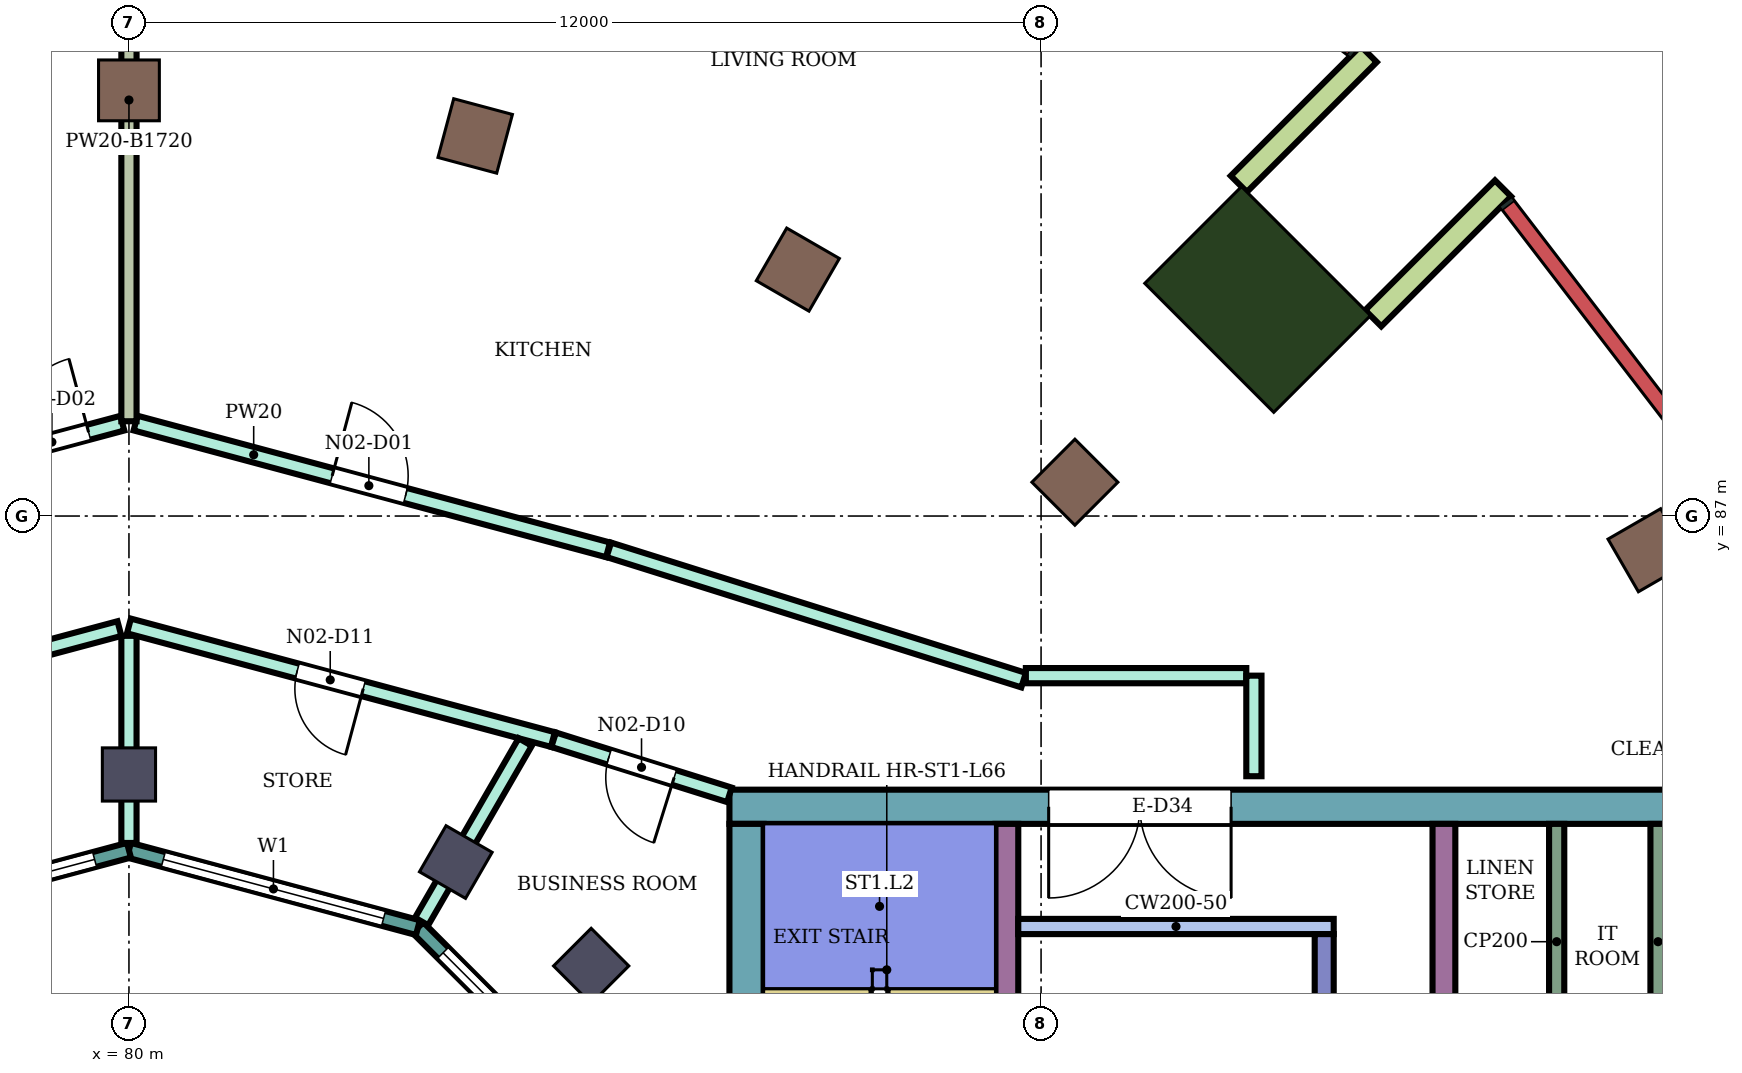
"""IFC4 building model, lengths in metres.
Left out: names, types, materials, properties, quantities, classifications, styles, units other than length and angle.
Written with IfcOpenShell. Run it as: python <this file> out.ifc"""

import sys

from ifc_helpers import new_model, si_unit, direction, frame, frame_2d, origin, origin_2d, place, context, subcontext, project, spatial, rectangle, extrude, element, fill, save


model = new_model("IFC4")
c1 = context("Model", 3, precision=1e-05, world=origin(), true_north=direction((0.0, 1.0)))
c2 = subcontext(c1, "Body", "Model", "MODEL_VIEW")
j1 = project(units=[si_unit("LENGTHUNIT", "METRE"), si_unit("PLANEANGLEUNIT", "RADIAN")], contexts=[c1])
p1 = place(None, origin())
s1 = spatial("IfcSite", under=j1, at=p1, CompositionType="ELEMENT")
p2 = place(p1, origin())
s2 = spatial("IfcBuilding", under=s1, at=p2, CompositionType="ELEMENT")
p3 = place(p2, frame((0.0, 0.0, 288.3)))
s3 = spatial("IfcBuildingStorey", under=s2, at=p3, CompositionType="ELEMENT", Elevation=288.3)
for number, where, z_axis, x_axis in (
    (1, (100.005, 86.55, 0.0), (0.0, 0.0, 1.0), (0.866, 0.5, 0.0)),
    (2, (92.445, 87.445, 0.0), (0.0, 0.0, 1.0), (0.707, 0.707, 0.0)),
    (3, (88.8, 90.242, 0.0), (0.0, 0.0, 1.0), (0.5, 0.866, 0.0)),
    (4, (84.555, 92.0, 0.0), (0.0, 0.0, 1.0), (0.259, 0.966, 0.0)),
    (5, (80.0, 92.6, 0.0), (0.0, 0.0, 1.0), (0.0, 1.0, 0.0)),
):
    element("IfcColumn", number, at=place(p3, frame(where, z_axis=z_axis, x_axis=x_axis)), inside=s3, PredefinedType="COLUMN", context=c2, shape_type="SweptSolid", body=[
        extrude(rectangle(XDim=0.8, YDim=0.8, at=origin_2d()), origin(), (0.0, 0.0, 1.0), 4.2),
    ])
for number, where, z_axis, x_axis in (
    (6, (86.081, 81.081, 0.0), (0.0, 0.0, 1.0), (0.707, 0.707, 0.0)),
    (7, (84.3, 82.448, 0.0), (0.0, 0.0, 1.0), (0.5, 0.866, 0.0)),
    (8, (80.0, 83.6, 0.0), (0.0, 0.0, 1.0), (0.0, 1.0, 0.0)),
):
    element("IfcColumn", number, at=place(p3, frame(where, z_axis=z_axis, x_axis=x_axis)), inside=s3, PredefinedType="COLUMN", context=c2, shape_type="SweptSolid", body=[
        extrude(rectangle(XDim=0.7, YDim=0.7, at=origin_2d()), origin(), (0.0, 0.0, 1.0), 4.2),
    ])
p4 = place(p3, frame((94.849, 89.849, 0.0), z_axis=(0.0, 0.0, 1.0), x_axis=(0.707106781187, 0.707106781187, 0.0)))
e9 = element("IfcColumn", 9, at=p4, inside=s3, PredefinedType="COLUMN", context=c2, shape_type="SweptSolid", body=[
    extrude(rectangle(XDim=1.8, YDim=2.4, at=origin_2d()), origin(), (0.0, 0.0, 1.0), 4.2),
])
p5 = place(p3, frame((87.9, 83.175, 0.0), z_axis=(0.0, 0.0, 1.0), x_axis=(1.0, 0.0, 0.0)))
e10 = element("IfcWall", 10, at=p5, inside=s3, PredefinedType="SHEAR", context=c2, shape_type="SweptSolid", body=[
    extrude(rectangle(XDim=13.55, YDim=0.45, at=frame_2d((6.775, 0.0))), origin(), (0.0, 0.0, 1.0), 3.88),
])
p6 = place(p5, frame((4.2, 0.0, 0.0)))
e11 = element("IfcOpeningElement", 11, at=p6, cuts=e10, PredefinedType="OPENING", context=c2, shape_type="SweptSolid", body=[
    extrude(rectangle(XDim=2.4, YDim=2.4, at=frame_2d((1.2, 1.2))), frame((0.0, 0.235, 0.0), z_axis=(0.0, -1.0, 0.0), x_axis=(1.0, 0.0, 0.0)), (0.0, 0.0, 1.0), 0.47),
])
p7 = place(p3, frame((88.125, 75.0, 0.0), z_axis=(0.0, 0.0, 1.0), x_axis=(0.0, 1.0, 0.0)))
e12 = element("IfcWall", 12, at=p7, inside=s3, PredefinedType="SHEAR", context=c2, shape_type="SweptSolid", body=[
    extrude(rectangle(XDim=7.95, YDim=0.45, at=frame_2d((3.975, 0.0))), origin(), (0.0, 0.0, 1.0), 3.88),
])
p8 = place(p3, frame((91.55, 75.0, 0.0), z_axis=(0.0, 0.0, 1.0), x_axis=(0.0, 1.0, 0.0)))
e13 = element("IfcWall", 13, at=p8, inside=s3, PredefinedType="SHEAR", context=c2, shape_type="SweptSolid", body=[
    extrude(rectangle(XDim=7.95, YDim=0.3, at=frame_2d((3.975, 0.0))), origin(), (0.0, 0.0, 1.0), 3.88),
])
p9 = place(p8, frame((1.85, 0.0, 0.0)))
e14 = element("IfcOpeningElement", 14, at=p9, cuts=e13, PredefinedType="OPENING", context=c2, shape_type="SweptSolid", body=[
    extrude(rectangle(XDim=0.9, YDim=2.1, at=frame_2d((0.45, 1.05))), frame((0.0, 0.16, 0.0), z_axis=(0.0, -1.0, 0.0), x_axis=(1.0, 0.0, 0.0)), (0.0, 0.0, 1.0), 0.32),
])
p10 = place(p3, frame((91.7, 81.6, 0.0), z_axis=(0.0, 0.0, 1.0), x_axis=(1.0, 0.0, 0.0)))
e15 = element("IfcWall", 15, at=p10, inside=s3, PredefinedType="SHEAR", context=c2, shape_type="SweptSolid", body=[
    extrude(rectangle(XDim=4.15, YDim=0.2, at=frame_2d((2.075, 0.0))), origin(), (0.0, 0.0, 1.0), 3.88),
])
p11 = place(p3, frame((95.725, 78.55, 0.0), z_axis=(0.0, 0.0, 1.0), x_axis=(0.0, 1.0, 0.0)))
e16 = element("IfcWall", 16, at=p11, inside=s3, PredefinedType="SHEAR", context=c2, shape_type="SweptSolid", body=[
    extrude(rectangle(XDim=2.95, YDim=0.25, at=frame_2d((1.475, 0.0))), origin(), (0.0, 0.0, 1.0), 3.88),
])
p12 = place(p11, frame((1.025, 0.0, 0.0)))
e17 = element("IfcOpeningElement", 17, at=p12, cuts=e16, PredefinedType="OPENING", context=c2, shape_type="SweptSolid", body=[
    extrude(rectangle(XDim=0.9, YDim=2.1, at=frame_2d((0.45, 1.05))), frame((0.0, 0.135, 0.0), z_axis=(0.0, -1.0, 0.0), x_axis=(1.0, 0.0, 0.0)), (0.0, 0.0, 1.0), 0.27),
])
p13 = place(p3, frame((97.3, 79.55, 0.0), z_axis=(0.0, 0.0, 1.0), x_axis=(0.0, 1.0, 0.0)))
e18 = element("IfcWall", 18, at=p13, inside=s3, PredefinedType="SHEAR", context=c2, shape_type="SweptSolid", body=[
    extrude(rectangle(XDim=3.4, YDim=0.3, at=frame_2d((1.7, 0.0))), origin(), (0.0, 0.0, 1.0), 3.88),
])
for number, where, z_axis, x_axis in (
    (19, (96.37, 89.602, 0.0), (0.0, 0.0, 1.0), (0.707, 0.707, 0.0)),
    (20, (94.602, 91.37, 0.0), (0.0, 0.0, 1.0), (0.707, 0.707, 0.0)),
):
    element("IfcWall", number, at=place(p3, frame(where, z_axis=z_axis, x_axis=x_axis)), inside=s3, PredefinedType="NOTDEFINED", context=c2, shape_type="SweptSolid", body=[
        extrude(rectangle(XDim=2.416, YDim=0.3, at=frame_2d((1.208, 0.0))), origin(), (0.0, 0.0, 1.0), 4.2),
    ])
p14 = place(p3, frame((86.585, 78.802, 0.0), z_axis=(0.0, 0.0, 1.0), x_axis=(-0.707106781187, 0.707106781187, 0.0)))
e21 = element("IfcWall", 21, at=p14, inside=s3, PredefinedType="NOTDEFINED", context=c2, shape_type="SweptSolid", body=[
    extrude(rectangle(XDim=3.936, YDim=0.2, at=frame_2d((1.968, 0.0))), origin(), (0.0, 0.0, 1.0), 4.2),
])
p15 = place(p14, frame((0.468, 0.0, 0.9)))
e22 = element("IfcOpeningElement", 22, at=p15, cuts=e21, PredefinedType="OPENING", context=c2, shape_type="SweptSolid", body=[
    extrude(rectangle(XDim=3.0, YDim=2.3, at=frame_2d((1.5, 1.15))), frame((0.0, 0.11, 0.0), z_axis=(0.0, -1.0, 0.0), x_axis=(1.0, 0.0, 0.0)), (0.0, 0.0, 1.0), 0.22),
])
p16 = place(p3, frame((83.802, 81.585, 0.0), z_axis=(0.0, 0.0, 1.0), x_axis=(-0.965933654434, 0.258789828301, 0.0)))
e23 = element("IfcWall", 23, at=p16, inside=s3, PredefinedType="NOTDEFINED", context=c2, shape_type="SweptSolid", body=[
    extrude(rectangle(XDim=3.936, YDim=0.2, at=frame_2d((1.968, 0.0))), origin(), (0.0, 0.0, 1.0), 4.2),
])
p17 = place(p16, frame((0.468, 0.0, 0.9)))
e24 = element("IfcOpeningElement", 24, at=p17, cuts=e23, PredefinedType="OPENING", context=c2, shape_type="SweptSolid", body=[
    extrude(rectangle(XDim=3.0, YDim=2.3, at=frame_2d((1.5, 1.15))), frame((0.0, 0.11, 0.0), z_axis=(0.0, -1.0, 0.0), x_axis=(1.0, 0.0, 0.0)), (0.0, 0.0, 1.0), 0.22),
])
p18 = place(p3, frame((80.0, 82.604, 0.0), z_axis=(0.0, 0.0, 1.0), x_axis=(-0.965933654434, -0.258789828301, 0.0)))
e25 = element("IfcWall", 25, at=p18, inside=s3, PredefinedType="NOTDEFINED", context=c2, shape_type="SweptSolid", body=[
    extrude(rectangle(XDim=3.936, YDim=0.2, at=frame_2d((1.968, 0.0))), origin(), (0.0, 0.0, 1.0), 4.2),
])
p19 = place(p18, frame((0.468, 0.0, 0.9)))
e26 = element("IfcOpeningElement", 26, at=p19, cuts=e25, PredefinedType="OPENING", context=c2, shape_type="SweptSolid", body=[
    extrude(rectangle(XDim=3.0, YDim=2.3, at=frame_2d((1.5, 1.15))), frame((0.0, 0.11, 0.0), z_axis=(0.0, -1.0, 0.0), x_axis=(1.0, 0.0, 0.0)), (0.0, 0.0, 1.0), 0.22),
])
p20 = place(p3, frame((73.687, 86.554, 0.0), z_axis=(0.0, 0.0, 1.0), x_axis=(0.96595903825, 0.258695064551, 0.0)))
e27 = element("IfcWall", 27, at=p20, inside=s3, PredefinedType="PARTITIONING", context=c2, shape_type="SweptSolid", body=[
    extrude(rectangle(XDim=6.446, YDim=0.2, at=frame_2d((3.223, 0.0))), origin(), (0.0, 0.0, 1.0), 3.75),
])
p21 = place(p20, frame((4.986, 0.0, 0.0)))
e28 = element("IfcOpeningElement", 28, at=p21, cuts=e27, PredefinedType="OPENING", context=c2, shape_type="SweptSolid", body=[
    extrude(rectangle(XDim=1.0, YDim=2.1, at=frame_2d((0.5, 1.05))), frame((0.0, 0.11, 0.0), z_axis=(0.0, -1.0, 0.0), x_axis=(1.0, 0.0, 0.0)), (0.0, 0.0, 1.0), 0.22),
])
p22 = place(p3, frame((74.413, 84.057, 0.0), z_axis=(0.0, 0.0, 1.0), x_axis=(0.965972135939, 0.258646153246, 0.0)))
e29 = element("IfcWall", 29, at=p22, inside=s3, PredefinedType="PARTITIONING", context=c2, shape_type="SweptSolid", body=[
    extrude(rectangle(XDim=5.654, YDim=0.2, at=frame_2d((2.827, 0.0))), origin(), (0.0, 0.0, 1.0), 3.75),
])
p23 = place(p22, frame((2.593, 0.0, 0.0)))
e30 = element("IfcOpeningElement", 30, at=p23, cuts=e29, PredefinedType="OPENING", context=c2, shape_type="SweptSolid", body=[
    extrude(rectangle(XDim=0.9, YDim=2.1, at=frame_2d((0.45, 1.05))), frame((0.0, 0.11, 0.0), z_axis=(0.0, -1.0, 0.0), x_axis=(1.0, 0.0, 0.0)), (0.0, 0.0, 1.0), 0.22),
])
p24 = place(p3, frame((80.0, 82.699, 0.0), z_axis=(0.0, 0.0, 1.0), x_axis=(0.0, 1.0, 0.0)))
e31 = element("IfcWall", 31, at=p24, inside=s3, PredefinedType="PARTITIONING", context=c2, shape_type="SweptSolid", body=[
    extrude(rectangle(XDim=2.725, YDim=0.2, at=frame_2d((1.363, 0.0))), origin(), (0.0, 0.0, 1.0), 3.75),
])
p25 = place(p3, frame((80.0, 85.554, 0.0), z_axis=(0.0, 0.0, 1.0), x_axis=(0.965928989968, -0.258807237802, 0.0)))
e32 = element("IfcWall", 32, at=p25, inside=s3, PredefinedType="PARTITIONING", context=c2, shape_type="SweptSolid", body=[
    extrude(rectangle(XDim=5.774, YDim=0.2, at=frame_2d((2.887, 0.0))), origin(), (0.0, 0.0, 1.0), 3.75),
])
p26 = place(p25, frame((2.292, 0.0, 0.0)))
e33 = element("IfcOpeningElement", 33, at=p26, cuts=e32, PredefinedType="OPENING", context=c2, shape_type="SweptSolid", body=[
    extrude(rectangle(XDim=0.9, YDim=2.1, at=frame_2d((0.45, 1.05))), frame((0.0, 0.11, 0.0), z_axis=(0.0, -1.0, 0.0), x_axis=(1.0, 0.0, 0.0)), (0.0, 0.0, 1.0), 0.22),
])
p27 = place(p3, frame((80.087, 88.223, 0.0), z_axis=(0.0, 0.0, 1.0), x_axis=(0.965852330757, -0.25909317855, 0.0)))
e34 = element("IfcWall", 34, at=p27, inside=s3, PredefinedType="PARTITIONING", context=c2, shape_type="SweptSolid", body=[
    extrude(rectangle(XDim=6.436, YDim=0.2, at=frame_2d((3.218, 0.0))), origin(), (0.0, 0.0, 1.0), 3.75),
])
p28 = place(p27, frame((2.678, 0.0, 0.0)))
e35 = element("IfcOpeningElement", 35, at=p28, cuts=e34, PredefinedType="OPENING", context=c2, shape_type="SweptSolid", body=[
    extrude(rectangle(XDim=1.0, YDim=2.1, at=frame_2d((0.5, 1.05))), frame((0.0, 0.11, 0.0), z_axis=(0.0, -1.0, 0.0), x_axis=(1.0, 0.0, 0.0)), (0.0, 0.0, 1.0), 0.22),
])
p29 = place(p3, frame((80.0, 88.247, 0.0), z_axis=(0.0, 0.0, 1.0), x_axis=(0.0, 1.0, 0.0)))
e36 = element("IfcWall", 36, at=p29, inside=s3, PredefinedType="PARTITIONING", context=c2, shape_type="SweptSolid", body=[
    extrude(rectangle(XDim=8.452, YDim=0.2, at=frame_2d((4.226, 0.0))), origin(), (0.0, 0.0, 1.0), 2.48),
])
p30 = place(p3, frame((83.85, 81.667, 0.0), z_axis=(0.0, 0.0, 1.0), x_axis=(0.500185068774, 0.865918527909, 0.0)))
e37 = element("IfcWall", 37, at=p30, inside=s3, PredefinedType="PARTITIONING", context=c2, shape_type="SweptSolid", body=[
    extrude(rectangle(XDim=2.726, YDim=0.2, at=frame_2d((1.363, 0.0))), origin(), (0.0, 0.0, 1.0), 3.75),
])
p31 = place(p3, frame((85.587, 84.057, 0.0), z_axis=(0.0, 0.0, 1.0), x_axis=(0.954239513179, -0.299043393987, 0.0)))
e38 = element("IfcWall", 38, at=p31, inside=s3, PredefinedType="PARTITIONING", context=c2, shape_type="SweptSolid", body=[
    extrude(rectangle(XDim=2.424, YDim=0.2, at=frame_2d((1.212, 0.0))), origin(), (0.0, 0.0, 1.0), 3.75),
])
p32 = place(p31, frame((0.762, 0.0, 0.0)))
e39 = element("IfcOpeningElement", 39, at=p32, cuts=e38, PredefinedType="OPENING", context=c2, shape_type="SweptSolid", body=[
    extrude(rectangle(XDim=0.9, YDim=2.1, at=frame_2d((0.45, 1.05))), frame((0.0, 0.11, 0.0), z_axis=(0.0, -1.0, 0.0), x_axis=(1.0, 0.0, 0.0)), (0.0, 0.0, 1.0), 0.22),
])
p33 = place(p3, frame((86.313, 86.555, 0.0), z_axis=(0.0, 0.0, 1.0), x_axis=(0.9540216201, -0.299737799389, 0.0)))
e40 = element("IfcWall", 40, at=p33, inside=s3, PredefinedType="PARTITIONING", context=c2, shape_type="SweptSolid", body=[
    extrude(rectangle(XDim=5.719, YDim=0.2, at=frame_2d((2.86, 0.0))), origin(), (0.0, 0.0, 1.0), 3.75),
])
p34 = place(p3, frame((91.8, 84.9, 0.0), z_axis=(0.0, 0.0, 1.0), x_axis=(1.0, 0.0, 0.0)))
e41 = element("IfcWall", 41, at=p34, inside=s3, PredefinedType="PARTITIONING", context=c2, shape_type="SweptSolid", body=[
    extrude(rectangle(XDim=2.9, YDim=0.2, at=frame_2d((1.45, 0.0))), origin(), (0.0, 0.0, 1.0), 3.75),
])
p35 = place(p3, frame((94.8, 83.577, 0.0), z_axis=(0.0, 0.0, 1.0), x_axis=(0.0, 1.0, 0.0)))
e42 = element("IfcWall", 42, at=p35, inside=s3, PredefinedType="PARTITIONING", context=c2, shape_type="SweptSolid", body=[
    extrude(rectangle(XDim=1.323, YDim=0.2, at=frame_2d((0.662, 0.0))), origin(), (0.0, 0.0, 1.0), 3.75),
])
for number, where, z_axis, x_axis in (
    (43, (98.783, 79.85, 0.0), (0.0, 0.0, 1.0), (0.0, 1.0, 0.0)),
    (44, (100.117, 79.85, 0.0), (0.0, 0.0, 1.0), (0.0, 1.0, 0.0)),
):
    element("IfcWall", number, at=place(p3, frame(where, z_axis=z_axis, x_axis=x_axis)), inside=s3, PredefinedType="PARTITIONING", context=c2, shape_type="SweptSolid", body=[
        extrude(rectangle(XDim=3.1, YDim=0.2, at=frame_2d((1.55, 0.0))), origin(), (0.0, 0.0, 1.0), 3.88),
    ])
p36 = place(p15, origin())
e45 = element("IfcWindow", 45, at=p36, inside=s3, PartitioningType="SINGLE_PANEL", PredefinedType="WINDOW", context=c2, shape_type="SweptSolid", body=[
    extrude(rectangle(XDim=3.0, YDim=2.3, at=frame_2d((1.5, 1.15))), frame((0.0, 0.03, 0.0), z_axis=(0.0, -1.0, 0.0), x_axis=(1.0, 0.0, 0.0)), (0.0, 0.0, 1.0), 0.06),
])
fill(e22, e45)
p37 = place(p17, origin())
e46 = element("IfcWindow", 46, at=p37, inside=s3, PartitioningType="SINGLE_PANEL", PredefinedType="WINDOW", context=c2, shape_type="SweptSolid", body=[
    extrude(rectangle(XDim=3.0, YDim=2.3, at=frame_2d((1.5, 1.15))), frame((0.0, 0.03, 0.0), z_axis=(0.0, -1.0, 0.0), x_axis=(1.0, 0.0, 0.0)), (0.0, 0.0, 1.0), 0.06),
])
fill(e24, e46)
p38 = place(p19, origin())
e47 = element("IfcWindow", 47, at=p38, inside=s3, PartitioningType="SINGLE_PANEL", PredefinedType="WINDOW", context=c2, shape_type="SweptSolid", body=[
    extrude(rectangle(XDim=3.0, YDim=2.3, at=frame_2d((1.5, 1.15))), frame((0.0, 0.03, 0.0), z_axis=(0.0, -1.0, 0.0), x_axis=(1.0, 0.0, 0.0)), (0.0, 0.0, 1.0), 0.06),
])
fill(e26, e47)
p39 = place(p28, origin())
e48 = element("IfcDoor", 48, at=p39, inside=s3, OperationType="SINGLE_SWING_LEFT", PredefinedType="DOOR", context=c2, shape_type="SweptSolid", body=[
    extrude(rectangle(XDim=1.0, YDim=2.1, at=frame_2d((0.5, 1.05))), frame((0.0, 0.025, 0.0), z_axis=(0.0, -1.0, 0.0), x_axis=(1.0, 0.0, 0.0)), (0.0, 0.0, 1.0), 0.05),
])
fill(e35, e48)
p40 = place(p21, origin())
e49 = element("IfcDoor", 49, at=p40, inside=s3, OperationType="SINGLE_SWING_RIGHT", PredefinedType="DOOR", context=c2, shape_type="SweptSolid", body=[
    extrude(rectangle(XDim=1.0, YDim=2.1, at=frame_2d((0.5, 1.05))), frame((0.0, 0.025, 0.0), z_axis=(0.0, -1.0, 0.0), x_axis=(1.0, 0.0, 0.0)), (0.0, 0.0, 1.0), 0.05),
])
fill(e28, e49)
p41 = place(p32, frame((0.9, 0.0, 0.0), z_axis=(0.0, 0.0, 1.0), x_axis=(-1.0, 0.0, 0.0)))
e50 = element("IfcDoor", 50, at=p41, inside=s3, OperationType="SINGLE_SWING_LEFT", PredefinedType="DOOR", context=c2, shape_type="SweptSolid", body=[
    extrude(rectangle(XDim=0.9, YDim=2.1, at=frame_2d((0.45, 1.05))), frame((0.0, 0.025, 0.0), z_axis=(0.0, -1.0, 0.0), x_axis=(1.0, 0.0, 0.0)), (0.0, 0.0, 1.0), 0.05),
])
fill(e39, e50)
p42 = place(p26, frame((0.9, 0.0, 0.0), z_axis=(0.0, 0.0, 1.0), x_axis=(-1.0, 0.0, 0.0)))
e51 = element("IfcDoor", 51, at=p42, inside=s3, OperationType="SINGLE_SWING_LEFT", PredefinedType="DOOR", context=c2, shape_type="SweptSolid", body=[
    extrude(rectangle(XDim=0.9, YDim=2.1, at=frame_2d((0.45, 1.05))), frame((0.0, 0.025, 0.0), z_axis=(0.0, -1.0, 0.0), x_axis=(1.0, 0.0, 0.0)), (0.0, 0.0, 1.0), 0.05),
])
fill(e33, e51)
p43 = place(p6, frame((2.4, 0.0, 0.0), z_axis=(0.0, 0.0, 1.0), x_axis=(-1.0, 0.0, 0.0)))
e52 = element("IfcDoor", 52, at=p43, inside=s3, OperationType="DOUBLE_DOOR_SINGLE_SWING", PredefinedType="DOOR", context=c2, shape_type="SweptSolid", body=[
    extrude(rectangle(XDim=2.4, YDim=2.4, at=frame_2d((1.2, 1.2))), frame((0.0, 0.025, 0.0), z_axis=(0.0, -1.0, 0.0), x_axis=(1.0, 0.0, 0.0)), (0.0, 0.0, 1.0), 0.05),
])
fill(e11, e52)
save(model, sys.argv[1])
